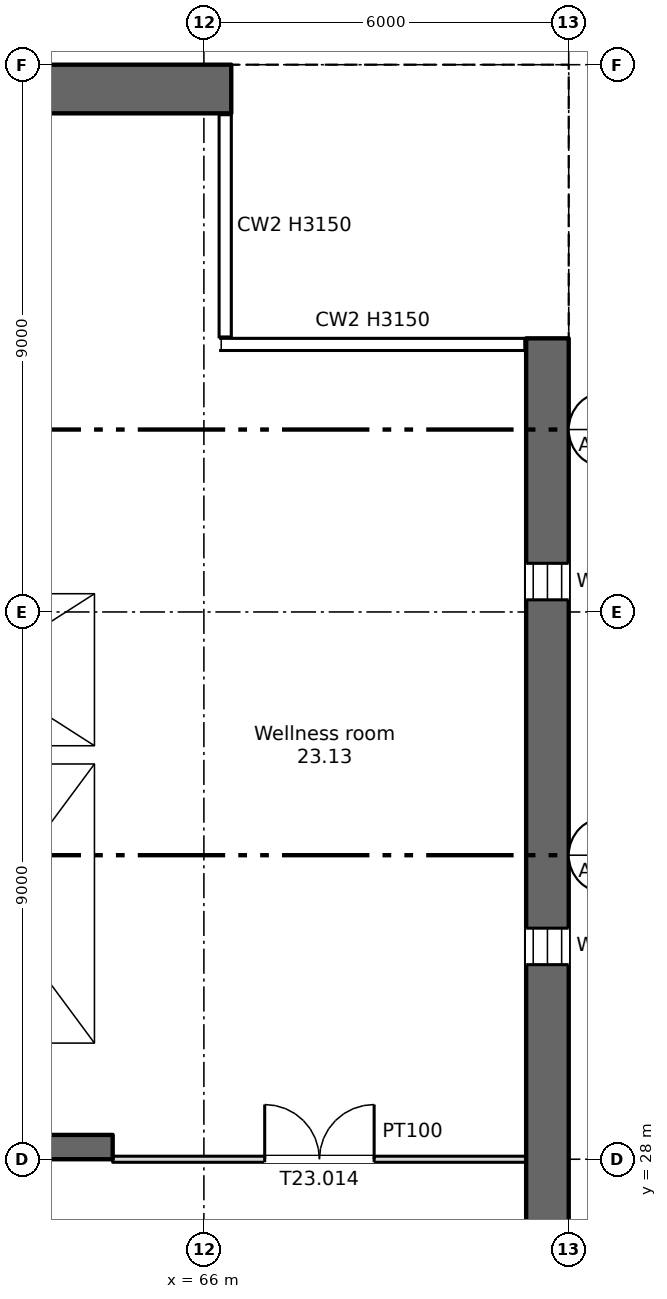
"""IFC4 building model, lengths in metres.
Left out: names, types, materials, properties, quantities, classifications, styles, units other than length and angle.
Written with IfcOpenShell. Run it as: python <this file> out.ifc"""

import sys

from ifc_helpers import new_model, si_unit, direction, frame, frame_2d, origin, place, context, subcontext, project, spatial, rectangle, extrude, element, fill, save


model = new_model("IFC4")
c1 = context("Model", 3, precision=1e-05, world=origin(), true_north=direction((0.0, 1.0)))
c2 = subcontext(c1, "Body", "Model", "MODEL_VIEW")
j1 = project(units=[si_unit("LENGTHUNIT", "METRE"), si_unit("PLANEANGLEUNIT", "RADIAN")], contexts=[c1])
p1 = place(None, origin())
s1 = spatial("IfcSite", under=j1, at=p1, CompositionType="ELEMENT")
p2 = place(p1, origin())
s2 = spatial("IfcBuilding", under=s1, at=p2, CompositionType="ELEMENT")
p3 = place(p2, frame((0.0, 0.0, 155.0)))
s3 = spatial("IfcBuildingStorey", under=s2, at=p3, CompositionType="ELEMENT", Elevation=155.0)
p4 = place(p3, frame((71.65, 6.0, 0.0), z_axis=(0.0, 0.0, 1.0), x_axis=(0.0, 1.0, 0.0)))
e1 = element("IfcWall", 1, at=p4, inside=s3, PredefinedType="SHEAR", context=c2, shape_type="SweptSolid", body=[
    extrude(rectangle(XDim=35.5, YDim=0.7, at=frame_2d((17.75, 0.0))), origin(), (0.0, 0.0, 1.0), 3.15),
])
p5 = place(p4, frame((1.2, 0.0, 0.6)))
e2 = element("IfcOpeningElement", 2, at=p5, cuts=e1, PredefinedType="OPENING", context=c2, shape_type="SweptSolid", body=[
    extrude(rectangle(XDim=0.6, YDim=2.4, at=frame_2d((0.3, 1.2))), frame((0.0, 0.36, 0.0), z_axis=(0.0, -1.0, 0.0), x_axis=(1.0, 0.0, 0.0)), (0.0, 0.0, 1.0), 0.72),
])
p6 = place(p4, frame((7.2, 0.0, 0.6)))
e3 = element("IfcOpeningElement", 3, at=p6, cuts=e1, PredefinedType="OPENING", context=c2, shape_type="SweptSolid", body=[
    extrude(rectangle(XDim=0.6, YDim=2.4, at=frame_2d((0.3, 1.2))), frame((0.0, 0.36, 0.0), z_axis=(0.0, -1.0, 0.0), x_axis=(1.0, 0.0, 0.0)), (0.0, 0.0, 1.0), 0.72),
])
p7 = place(p4, frame((13.2, 0.0, 0.6)))
e4 = element("IfcOpeningElement", 4, at=p7, cuts=e1, PredefinedType="OPENING", context=c2, shape_type="SweptSolid", body=[
    extrude(rectangle(XDim=0.6, YDim=2.4, at=frame_2d((0.3, 1.2))), frame((0.0, 0.36, 0.0), z_axis=(0.0, -1.0, 0.0), x_axis=(1.0, 0.0, 0.0)), (0.0, 0.0, 1.0), 0.72),
])
p8 = place(p4, frame((19.2, 0.0, 0.6)))
e5 = element("IfcOpeningElement", 5, at=p8, cuts=e1, PredefinedType="OPENING", context=c2, shape_type="SweptSolid", body=[
    extrude(rectangle(XDim=0.6, YDim=2.4, at=frame_2d((0.3, 1.2))), frame((0.0, 0.36, 0.0), z_axis=(0.0, -1.0, 0.0), x_axis=(1.0, 0.0, 0.0)), (0.0, 0.0, 1.0), 0.72),
])
p9 = place(p4, frame((25.2, 0.0, 0.6)))
e6 = element("IfcOpeningElement", 6, at=p9, cuts=e1, PredefinedType="OPENING", context=c2, shape_type="SweptSolid", body=[
    extrude(rectangle(XDim=0.6, YDim=2.4, at=frame_2d((0.3, 1.2))), frame((0.0, 0.36, 0.0), z_axis=(0.0, -1.0, 0.0), x_axis=(1.0, 0.0, 0.0)), (0.0, 0.0, 1.0), 0.72),
])
p10 = place(p4, frame((31.2, 0.0, 0.6)))
e7 = element("IfcOpeningElement", 7, at=p10, cuts=e1, PredefinedType="OPENING", context=c2, shape_type="SweptSolid", body=[
    extrude(rectangle(XDim=0.6, YDim=2.4, at=frame_2d((0.3, 1.2))), frame((0.0, 0.36, 0.0), z_axis=(0.0, -1.0, 0.0), x_axis=(1.0, 0.0, 0.0)), (0.0, 0.0, 1.0), 0.72),
])
p11 = place(p3, frame((5.55, 45.6, 0.0), z_axis=(0.0, 0.0, 1.0), x_axis=(1.0, 0.0, 0.0)))
e8 = element("IfcWall", 8, at=p11, inside=s3, PredefinedType="SHEAR", context=c2, shape_type="SweptSolid", body=[
    extrude(rectangle(XDim=60.9, YDim=0.8, at=frame_2d((30.45, 0.0))), origin(), (0.0, 0.0, 1.0), 3.15),
])
p12 = place(p11, frame((1.2, 0.0, 0.6)))
e9 = element("IfcOpeningElement", 9, at=p12, cuts=e8, PredefinedType="OPENING", context=c2, shape_type="SweptSolid", body=[
    extrude(rectangle(XDim=0.6, YDim=2.4, at=frame_2d((0.3, 1.2))), frame((0.0, 0.41, 0.0), z_axis=(0.0, -1.0, 0.0), x_axis=(1.0, 0.0, 0.0)), (0.0, 0.0, 1.0), 0.82),
])
p13 = place(p11, frame((7.2, 0.0, 0.6)))
e10 = element("IfcOpeningElement", 10, at=p13, cuts=e8, PredefinedType="OPENING", context=c2, shape_type="SweptSolid", body=[
    extrude(rectangle(XDim=0.6, YDim=2.4, at=frame_2d((0.3, 1.2))), frame((0.0, 0.41, 0.0), z_axis=(0.0, -1.0, 0.0), x_axis=(1.0, 0.0, 0.0)), (0.0, 0.0, 1.0), 0.82),
])
p14 = place(p3, frame((6.7, 28.2, 0.0), z_axis=(0.0, 0.0, 1.0), x_axis=(1.0, 0.0, 0.0)))
e11 = element("IfcWall", 11, at=p14, inside=s3, PredefinedType="SHEAR", context=c2, shape_type="SweptSolid", body=[
    extrude(rectangle(XDim=57.8, YDim=0.4, at=frame_2d((28.9, 0.0))), origin(), (0.0, 0.0, 1.0), 3.15),
])
p15 = place(p14, frame((12.562, 0.0, 0.0)))
e12 = element("IfcOpeningElement", 12, at=p15, cuts=e11, PredefinedType="OPENING", context=c2, shape_type="SweptSolid", body=[
    extrude(rectangle(XDim=0.9, YDim=2.1, at=frame_2d((0.45, 1.05))), frame((0.0, 0.21, 0.0), z_axis=(0.0, -1.0, 0.0), x_axis=(1.0, 0.0, 0.0)), (0.0, 0.0, 1.0), 0.42),
])
p16 = place(p14, frame((15.137, 0.0, 0.0)))
e13 = element("IfcOpeningElement", 13, at=p16, cuts=e11, PredefinedType="OPENING", context=c2, shape_type="SweptSolid", body=[
    extrude(rectangle(XDim=0.9, YDim=2.1, at=frame_2d((0.45, 1.05))), frame((0.0, 0.21, 0.0), z_axis=(0.0, -1.0, 0.0), x_axis=(1.0, 0.0, 0.0)), (0.0, 0.0, 1.0), 0.42),
])
p17 = place(p14, frame((49.85, 0.0, 0.0)))
e14 = element("IfcOpeningElement", 14, at=p17, cuts=e11, PredefinedType="OPENING", context=c2, shape_type="SweptSolid", body=[
    extrude(rectangle(XDim=0.9, YDim=2.1, at=frame_2d((0.45, 1.05))), frame((0.0, 0.21, 0.0), z_axis=(0.0, -1.0, 0.0), x_axis=(1.0, 0.0, 0.0)), (0.0, 0.0, 1.0), 0.42),
])
p18 = place(p14, frame((0.562, 0.0, 0.0)))
e15 = element("IfcOpeningElement", 15, at=p18, cuts=e11, PredefinedType="OPENING", context=c2, shape_type="SweptSolid", body=[
    extrude(rectangle(XDim=0.9, YDim=2.1, at=frame_2d((0.45, 1.05))), frame((0.0, 0.21, 0.0), z_axis=(0.0, -1.0, 0.0), x_axis=(1.0, 0.0, 0.0)), (0.0, 0.0, 1.0), 0.42),
])
p19 = place(p14, frame((2.137, 0.0, 0.0)))
e16 = element("IfcOpeningElement", 16, at=p19, cuts=e11, PredefinedType="OPENING", context=c2, shape_type="SweptSolid", body=[
    extrude(rectangle(XDim=0.9, YDim=2.1, at=frame_2d((0.45, 1.05))), frame((0.0, 0.21, 0.0), z_axis=(0.0, -1.0, 0.0), x_axis=(1.0, 0.0, 0.0)), (0.0, 0.0, 1.0), 0.42),
])
p20 = place(p14, frame((4.7, 0.0, 0.0)))
e17 = element("IfcOpeningElement", 17, at=p20, cuts=e11, PredefinedType="OPENING", context=c2, shape_type="SweptSolid", body=[
    extrude(rectangle(XDim=1.2, YDim=2.1, at=frame_2d((0.6, 1.05))), frame((0.0, 0.21, 0.0), z_axis=(0.0, -1.0, 0.0), x_axis=(1.0, 0.0, 0.0)), (0.0, 0.0, 1.0), 0.42),
])
p21 = place(p14, frame((31.7, 0.0, 0.0)))
e18 = element("IfcOpeningElement", 18, at=p21, cuts=e11, PredefinedType="OPENING", context=c2, shape_type="SweptSolid", body=[
    extrude(rectangle(XDim=1.2, YDim=2.1, at=frame_2d((0.6, 1.05))), frame((0.0, 0.21, 0.0), z_axis=(0.0, -1.0, 0.0), x_axis=(1.0, 0.0, 0.0)), (0.0, 0.0, 1.0), 0.42),
])
p22 = place(p14, frame((55.2, 0.0, 0.0)))
e19 = element("IfcOpeningElement", 19, at=p22, cuts=e11, PredefinedType="OPENING", context=c2, shape_type="SweptSolid", body=[
    extrude(rectangle(XDim=1.2, YDim=2.1, at=frame_2d((0.6, 1.05))), frame((0.0, 0.21, 0.0), z_axis=(0.0, -1.0, 0.0), x_axis=(1.0, 0.0, 0.0)), (0.0, 0.0, 1.0), 0.42),
])
p23 = place(p14, frame((21.7, 0.0, 0.0)))
e20 = element("IfcOpeningElement", 20, at=p23, cuts=e11, PredefinedType="OPENING", context=c2, shape_type="SweptSolid", body=[
    extrude(rectangle(XDim=1.2, YDim=2.1, at=frame_2d((0.6, 1.05))), frame((0.0, 0.21, 0.0), z_axis=(0.0, -1.0, 0.0), x_axis=(1.0, 0.0, 0.0)), (0.0, 0.0, 1.0), 0.42),
])
p24 = place(p14, frame((41.7, 0.0, 0.0)))
e21 = element("IfcOpeningElement", 21, at=p24, cuts=e11, PredefinedType="OPENING", context=c2, shape_type="SweptSolid", body=[
    extrude(rectangle(XDim=1.2, YDim=2.1, at=frame_2d((0.6, 1.05))), frame((0.0, 0.21, 0.0), z_axis=(0.0, -1.0, 0.0), x_axis=(1.0, 0.0, 0.0)), (0.0, 0.0, 1.0), 0.42),
])
p25 = place(p14, frame((24.85, 0.0, 0.0)))
e22 = element("IfcOpeningElement", 22, at=p25, cuts=e11, PredefinedType="OPENING", context=c2, shape_type="SweptSolid", body=[
    extrude(rectangle(XDim=2.4, YDim=2.1, at=frame_2d((1.2, 1.05))), frame((0.0, 0.21, 0.0), z_axis=(0.0, -1.0, 0.0), x_axis=(1.0, 0.0, 0.0)), (0.0, 0.0, 1.0), 0.42),
])
p26 = place(p14, frame((37.35, 0.0, 0.0)))
e23 = element("IfcOpeningElement", 23, at=p26, cuts=e11, PredefinedType="OPENING", context=c2, shape_type="SweptSolid", body=[
    extrude(rectangle(XDim=2.4, YDim=2.1, at=frame_2d((1.2, 1.05))), frame((0.0, 0.21, 0.0), z_axis=(0.0, -1.0, 0.0), x_axis=(1.0, 0.0, 0.0)), (0.0, 0.0, 1.0), 0.42),
])
p27 = place(p14, frame((7.95, 0.0, 0.0)))
e24 = element("IfcOpeningElement", 24, at=p27, cuts=e11, PredefinedType="OPENING", context=c2, shape_type="SweptSolid", body=[
    extrude(rectangle(XDim=2.4, YDim=2.1, at=frame_2d((1.2, 1.05))), frame((0.0, 0.21, 0.0), z_axis=(0.0, -1.0, 0.0), x_axis=(1.0, 0.0, 0.0)), (0.0, 0.0, 1.0), 0.42),
])
p28 = place(p14, frame((28.85, 0.0, 0.0)))
e25 = element("IfcOpeningElement", 25, at=p28, cuts=e11, PredefinedType="OPENING", context=c2, shape_type="SweptSolid", body=[
    extrude(rectangle(XDim=0.9, YDim=2.1, at=frame_2d((0.45, 1.05))), frame((0.0, 0.21, 0.0), z_axis=(0.0, -1.0, 0.0), x_axis=(1.0, 0.0, 0.0)), (0.0, 0.0, 1.0), 0.42),
])
p29 = place(p14, frame((34.85, 0.0, 0.0)))
e26 = element("IfcOpeningElement", 26, at=p29, cuts=e11, PredefinedType="OPENING", context=c2, shape_type="SweptSolid", body=[
    extrude(rectangle(XDim=0.9, YDim=2.1, at=frame_2d((0.45, 1.05))), frame((0.0, 0.21, 0.0), z_axis=(0.0, -1.0, 0.0), x_axis=(1.0, 0.0, 0.0)), (0.0, 0.0, 1.0), 0.42),
])
p30 = place(p3, frame((64.35, 34.8, 0.0), z_axis=(0.0, 0.0, 1.0), x_axis=(0.0, 1.0, 0.0)))
e27 = element("IfcWall", 27, at=p30, inside=s3, PredefinedType="SHEAR", context=c2, shape_type="SweptSolid", body=[
    extrude(rectangle(XDim=10.4, YDim=0.3, at=frame_2d((5.2, 0.0))), origin(), (0.0, 0.0, 1.0), 3.15),
])
p31 = place(p3, frame((64.35, 28.4, 0.0), z_axis=(0.0, 0.0, 1.0), x_axis=(0.0, 1.0, 0.0)))
e28 = element("IfcWall", 28, at=p31, inside=s3, PredefinedType="SHEAR", context=c2, shape_type="SweptSolid", body=[
    extrude(rectangle(XDim=6.1, YDim=0.3, at=frame_2d((3.05, 0.0))), origin(), (0.0, 0.0, 1.0), 3.15),
])
p32 = place(p3, frame((60.3, 34.65, 0.0), z_axis=(0.0, 0.0, 1.0), x_axis=(1.0, 0.0, 0.0)))
e29 = element("IfcWall", 29, at=p32, inside=s3, PredefinedType="SHEAR", context=c2, shape_type="SweptSolid", body=[
    extrude(rectangle(XDim=4.2, YDim=0.3, at=frame_2d((2.1, 0.0))), origin(), (0.0, 0.0, 1.0), 3.15),
])
p33 = place(p3, frame((60.3, 37.45, 0.0), z_axis=(0.0, 0.0, 1.0), x_axis=(1.0, 0.0, 0.0)))
e30 = element("IfcWall", 30, at=p33, inside=s3, PredefinedType="SHEAR", context=c2, shape_type="SweptSolid", body=[
    extrude(rectangle(XDim=3.9, YDim=0.3, at=frame_2d((1.95, 0.0))), origin(), (0.0, 0.0, 1.0), 3.15),
])
p34 = place(p33, frame((1.4, 0.0, 0.0)))
e31 = element("IfcOpeningElement", 31, at=p34, cuts=e30, PredefinedType="OPENING", context=c2, shape_type="SweptSolid", body=[
    extrude(rectangle(XDim=1.1, YDim=2.1, at=frame_2d((0.55, 1.05))), frame((0.0, 0.16, 0.0), z_axis=(0.0, -1.0, 0.0), x_axis=(1.0, 0.0, 0.0)), (0.0, 0.0, 1.0), 0.32),
])
p35 = place(p3, frame((64.5, 28.0, 0.0), z_axis=(0.0, 0.0, 1.0), x_axis=(1.0, 0.0, 0.0)))
e32 = element("IfcWall", 32, at=p35, inside=s3, PredefinedType="PARTITIONING", context=c2, shape_type="SweptSolid", body=[
    extrude(rectangle(XDim=6.8, YDim=0.1, at=frame_2d((3.4, 0.0))), origin(), (0.0, 0.0, 1.0), 3.15),
])
p36 = place(p35, frame((2.5, 0.0, 0.0)))
e33 = element("IfcOpeningElement", 33, at=p36, cuts=e32, PredefinedType="OPENING", context=c2, shape_type="SweptSolid", body=[
    extrude(rectangle(XDim=1.8, YDim=2.1, at=frame_2d((0.9, 1.05))), frame((0.0, 0.06, 0.0), z_axis=(0.0, -1.0, 0.0), x_axis=(1.0, 0.0, 0.0)), (0.0, 0.0, 1.0), 0.12),
])
p37 = place(p9, origin())
e34 = element("IfcWindow", 34, at=p37, inside=s3, PartitioningType="SINGLE_PANEL", PredefinedType="WINDOW", context=c2, shape_type="SweptSolid", body=[
    extrude(rectangle(XDim=0.6, YDim=2.4, at=frame_2d((0.3, 1.2))), frame((0.0, 0.03, 0.0), z_axis=(0.0, -1.0, 0.0), x_axis=(1.0, 0.0, 0.0)), (0.0, 0.0, 1.0), 0.06),
])
fill(e6, e34)
p38 = place(p10, origin())
e35 = element("IfcWindow", 35, at=p38, inside=s3, PartitioningType="SINGLE_PANEL", PredefinedType="WINDOW", context=c2, shape_type="SweptSolid", body=[
    extrude(rectangle(XDim=0.6, YDim=2.4, at=frame_2d((0.3, 1.2))), frame((0.0, 0.03, 0.0), z_axis=(0.0, -1.0, 0.0), x_axis=(1.0, 0.0, 0.0)), (0.0, 0.0, 1.0), 0.06),
])
fill(e7, e35)
p39 = place(p36, origin())
e36 = element("IfcDoor", 36, at=p39, inside=s3, OperationType="DOUBLE_DOOR_SINGLE_SWING", PredefinedType="DOOR", context=c2, shape_type="SweptSolid", body=[
    extrude(rectangle(XDim=1.8, YDim=2.1, at=frame_2d((0.9, 1.05))), frame((0.0, 0.025, 0.0), z_axis=(0.0, -1.0, 0.0), x_axis=(1.0, 0.0, 0.0)), (0.0, 0.0, 1.0), 0.05),
])
fill(e33, e36)
save(model, sys.argv[1])
